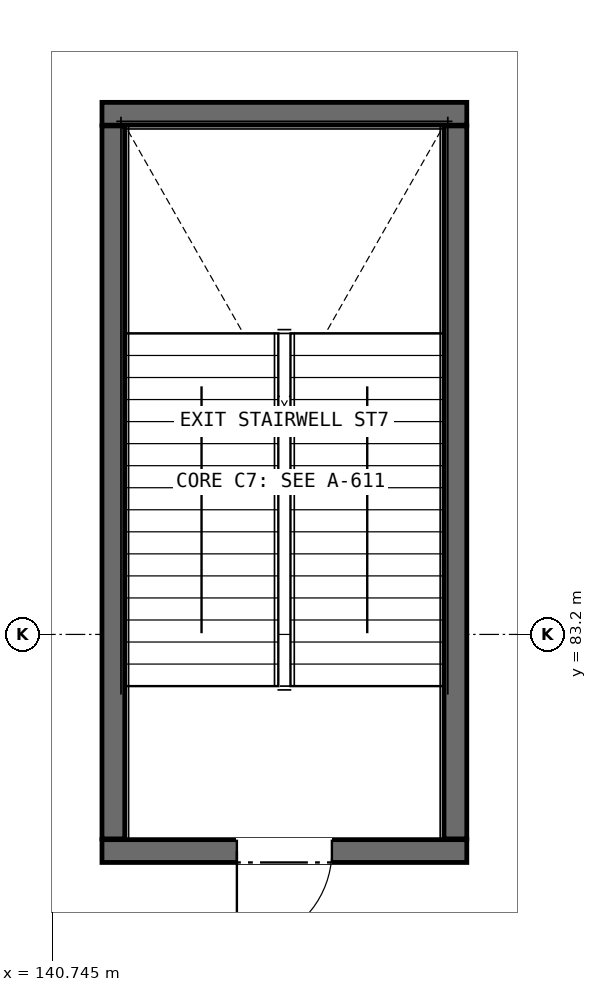
"""IFC4 building model, lengths in metres.
Left out: names, types, materials, properties, quantities, classifications, styles, units other than length and angle.
Written with IfcOpenShell. Run it as: python <this file> out.ifc"""

import sys

from ifc_helpers import new_model, si_unit, direction, frame, frame_2d, origin, place, context, subcontext, project, spatial, rectangle, extrude, element, fill, save


model = new_model("IFC4")
c1 = context("Model", 3, precision=1e-05, world=origin(), true_north=direction((0.0, 1.0)))
c2 = subcontext(c1, "Body", "Model", "MODEL_VIEW")
j1 = project(units=[si_unit("LENGTHUNIT", "METRE"), si_unit("PLANEANGLEUNIT", "RADIAN")], contexts=[c1])
p1 = place(None, origin())
s1 = spatial("IfcSite", under=j1, at=p1, CompositionType="ELEMENT")
p2 = place(p1, origin())
s2 = spatial("IfcBuilding", under=s1, at=p2, CompositionType="ELEMENT")
p3 = place(p2, origin())
s3 = spatial("IfcBuildingStorey", under=s2, at=p3, CompositionType="ELEMENT", Elevation=0.0)
p4 = place(p3, frame((141.4, 80.35, 0.0), z_axis=(0.0, 0.0, 1.0), x_axis=(1.0, 0.0, 0.0)))
e1 = element("IfcWall", 1, at=p4, inside=s3, PredefinedType="SHEAR", context=c2, shape_type="SweptSolid", body=[
    extrude(rectangle(XDim=4.8, YDim=0.3, at=frame_2d((2.4, 0.0))), origin(), (0.0, 0.0, 1.0), 5.335),
])
p5 = place(p4, frame((1.775, 0.0, 0.0)))
e2 = element("IfcOpeningElement", 2, at=p5, cuts=e1, PredefinedType="OPENING", context=c2, shape_type="SweptSolid", body=[
    extrude(rectangle(XDim=1.25, YDim=2.2, at=frame_2d((0.625, 1.1))), frame((0.0, 0.16, 0.0), z_axis=(0.0, -1.0, 0.0), x_axis=(1.0, 0.0, 0.0)), (0.0, 0.0, 1.0), 0.32),
])
p6 = place(p3, frame((146.2, 90.05, 0.0), z_axis=(0.0, 0.0, 1.0), x_axis=(-1.0, 0.0, 0.0)))
e3 = element("IfcWall", 3, at=p6, inside=s3, PredefinedType="SHEAR", context=c2, shape_type="SweptSolid", body=[
    extrude(rectangle(XDim=4.8, YDim=0.3, at=frame_2d((2.4, 0.0))), origin(), (0.0, 0.0, 1.0), 5.335),
])
for number, where, z_axis, x_axis in (
    (4, (146.05, 80.51, 0.0), (0.0, 0.0, 1.0), (0.0, 1.0, 0.0)),
    (5, (141.55, 89.89, 0.0), (0.0, 0.0, 1.0), (0.0, -1.0, 0.0)),
):
    element("IfcWall", number, at=place(p3, frame(where, z_axis=z_axis, x_axis=x_axis)), inside=s3, PredefinedType="SHEAR", context=c2, shape_type="SweptSolid", body=[
        extrude(rectangle(XDim=9.38, YDim=0.3, at=frame_2d((4.69, 0.0))), origin(), (0.0, 0.0, 1.0), 5.335),
    ])
p7 = place(p5, frame((1.25, 0.0, 0.0), z_axis=(0.0, 0.0, 1.0), x_axis=(-1.0, 0.0, 0.0)))
e6 = element("IfcDoor", 6, at=p7, inside=s3, OperationType="SINGLE_SWING_LEFT", PredefinedType="DOOR", context=c2, shape_type="SweptSolid", body=[
    extrude(rectangle(XDim=1.25, YDim=2.2, at=frame_2d((0.625, 1.1))), frame((0.0, 0.025, 0.0), z_axis=(0.0, -1.0, 0.0), x_axis=(1.0, 0.0, 0.0)), (0.0, 0.0, 1.0), 0.05),
])
fill(e2, e6)
save(model, sys.argv[1])
